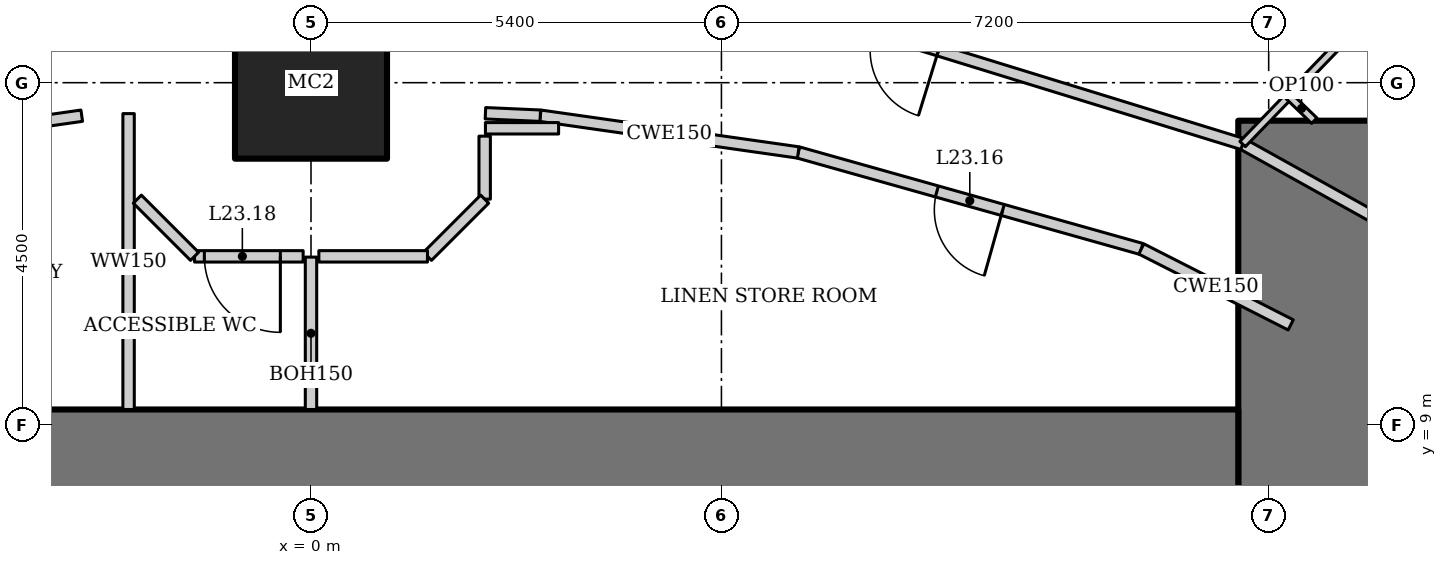
"""IFC4 building model, lengths in metres.
Left out: names, types, materials, properties, quantities, classifications, styles, units other than length and angle.
Written with IfcOpenShell. Run it as: python <this file> out.ifc"""

import sys

from ifc_helpers import new_model, si_unit, direction, frame, frame_2d, origin, origin_2d, place, context, subcontext, project, spatial, rectangle, hollow_rectangle, extrude, element, fill, save


model = new_model("IFC4")
c1 = context("Model", 3, precision=1e-05, world=origin(), true_north=direction((0.0, 1.0)))
c2 = subcontext(c1, "Body", "Model", "MODEL_VIEW")
j1 = project(units=[si_unit("LENGTHUNIT", "METRE"), si_unit("PLANEANGLEUNIT", "RADIAN")], contexts=[c1])
p1 = place(None, origin())
s1 = spatial("IfcSite", under=j1, at=p1, CompositionType="ELEMENT")
p2 = place(p1, origin())
s2 = spatial("IfcBuilding", under=s1, at=p2, CompositionType="ELEMENT")
p3 = place(p2, frame((0.0, 0.0, 98.2)))
s3 = spatial("IfcBuildingStorey", under=s2, at=p3, CompositionType="ELEMENT", Elevation=98.2)
p4 = place(p3, frame((0.0, 13.5, 0.0), z_axis=(0.0, 0.0, 1.0), x_axis=(1.0, 0.0, 0.0)))
e1 = element("IfcColumn", 1, at=p4, inside=s3, PredefinedType="COLUMN", context=c2, shape_type="SweptSolid", body=[
    extrude(hollow_rectangle(XDim=2.0, YDim=2.0, WallThickness=0.17, at=origin_2d()), origin(), (0.0, 0.0, 1.0), 3.6),
])
p5 = place(p3, frame((13.2, -13.0, 0.0), z_axis=(0.0, 0.0, 1.0), x_axis=(0.0, 1.0, 0.0)))
e2 = element("IfcWall", 2, at=p5, inside=s3, PredefinedType="SHEAR", context=c2, shape_type="SweptSolid", body=[
    extrude(rectangle(XDim=26.0, YDim=2.0, at=frame_2d((13.0, 0.0))), origin(), (0.0, 0.0, 1.0), 3.6),
])
p6 = place(p5, frame((12.1, 0.0, 0.0)))
e3 = element("IfcOpeningElement", 3, at=p6, cuts=e2, PredefinedType="OPENING", context=c2, shape_type="SweptSolid", body=[
    extrude(rectangle(XDim=1.8, YDim=2.1, at=frame_2d((0.9, 1.05))), frame((0.0, 1.01, 0.0), z_axis=(0.0, -1.0, 0.0), x_axis=(1.0, 0.0, 0.0)), (0.0, 0.0, 1.0), 2.02),
])
p7 = place(p3, frame((12.2, 8.0, 0.0), z_axis=(0.0, 0.0, 1.0), x_axis=(-1.0, 0.0, 0.0)))
e4 = element("IfcWall", 4, at=p7, inside=s3, PredefinedType="SHEAR", context=c2, shape_type="SweptSolid", body=[
    extrude(rectangle(XDim=24.4, YDim=2.4, at=frame_2d((12.2, 0.0))), origin(), (0.0, 0.0, 1.0), 3.6),
])
p8 = place(p3, frame((17.299, 9.885, 0.0), z_axis=(0.0, 0.0, 1.0), x_axis=(-0.873695910579, 0.486472461541, 0.0)))
e5 = element("IfcWall", 5, at=p8, inside=s3, PredefinedType="PARTITIONING", context=c2, shape_type="SweptSolid", body=[
    extrude(rectangle(XDim=5.771, YDim=0.15, at=frame_2d((2.885, 0.0))), origin(), (0.0, 0.0, 1.0), 3.45),
])
p9 = place(p3, frame((12.257, 12.693, 0.0), z_axis=(0.0, 0.0, 1.0), x_axis=(-0.955657956744, 0.294478980085, 0.0)))
e6 = element("IfcWall", 6, at=p9, inside=s3, PredefinedType="PARTITIONING", context=c2, shape_type="SweptSolid", body=[
    extrude(rectangle(XDim=5.236, YDim=0.15, at=frame_2d((2.618, 0.0))), origin(), (0.0, 0.0, 1.0), 3.45),
])
p10 = place(p9, frame((4.186, 0.0, 0.0)))
e7 = element("IfcOpeningElement", 7, at=p10, cuts=e6, PredefinedType="OPENING", context=c2, shape_type="SweptSolid", body=[
    extrude(rectangle(XDim=0.9, YDim=2.1, at=frame_2d((0.45, 1.05))), frame((0.0, 0.085, 0.0), z_axis=(0.0, -1.0, 0.0), x_axis=(1.0, 0.0, 0.0)), (0.0, 0.0, 1.0), 0.17),
])
p11 = place(p3, frame((10.924, 11.312, 0.0), z_axis=(0.0, 0.0, 1.0), x_axis=(-0.962643729928, 0.270771211967, 0.0)))
e8 = element("IfcWall", 8, at=p11, inside=s3, PredefinedType="PARTITIONING", context=c2, shape_type="SweptSolid", body=[
    extrude(rectangle(XDim=4.688, YDim=0.15, at=frame_2d((2.344, 0.0))), origin(), (0.0, 0.0, 1.0), 3.45),
])
p12 = place(p11, frame((1.894, 0.0, 0.0)))
e9 = element("IfcOpeningElement", 9, at=p12, cuts=e8, PredefinedType="OPENING", context=c2, shape_type="SweptSolid", body=[
    extrude(rectangle(XDim=0.9, YDim=2.1, at=frame_2d((0.45, 1.05))), frame((0.0, 0.085, 0.0), z_axis=(0.0, -1.0, 0.0), x_axis=(1.0, 0.0, 0.0)), (0.0, 0.0, 1.0), 0.17),
])
p13 = place(p3, frame((6.411, 12.582, 0.0), z_axis=(0.0, 0.0, 1.0), x_axis=(-0.990002114939, 0.14105251652, 0.0)))
e10 = element("IfcWall", 10, at=p13, inside=s3, PredefinedType="PARTITIONING", context=c2, shape_type="SweptSolid", body=[
    extrude(rectangle(XDim=3.429, YDim=0.15, at=frame_2d((1.714, 0.0))), origin(), (0.0, 0.0, 1.0), 3.45),
])
p14 = place(p3, frame((-3.016, 13.066, 0.0), z_axis=(0.0, 0.0, 1.0), x_axis=(-0.990002114939, -0.14105251652, 0.0)))
e11 = element("IfcWall", 11, at=p14, inside=s3, PredefinedType="PARTITIONING", context=c2, shape_type="SweptSolid", body=[
    extrude(rectangle(XDim=3.429, YDim=0.15, at=frame_2d((1.714, 0.0))), origin(), (0.0, 0.0, 1.0), 3.45),
])
p15 = place(p14, frame((1.195, 0.0, 0.0)))
e12 = element("IfcOpeningElement", 12, at=p15, cuts=e11, PredefinedType="OPENING", context=c2, shape_type="SweptSolid", body=[
    extrude(rectangle(XDim=0.9, YDim=2.1, at=frame_2d((0.45, 1.05))), frame((0.0, 0.085, 0.0), z_axis=(0.0, -1.0, 0.0), x_axis=(1.0, 0.0, 0.0)), (0.0, 0.0, 1.0), 0.17),
])
p16 = place(p3, frame((-2.4, 9.2, 0.0), z_axis=(0.0, 0.0, 1.0), x_axis=(0.0, 1.0, 0.0)))
e13 = element("IfcWall", 13, at=p16, inside=s3, PredefinedType="SOLIDWALL", context=c2, shape_type="SweptSolid", body=[
    extrude(rectangle(XDim=3.893, YDim=0.15, at=frame_2d((1.947, 0.0))), origin(), (0.0, 0.0, 1.0), 2.767),
])
p17 = place(p3, frame((16.944, 17.545, 0.0), z_axis=(0.0, 0.0, 1.0), x_axis=(-0.694677175107, -0.719321640426, 0.0)))
e14 = element("IfcWall", 14, at=p17, inside=s3, PredefinedType="PARTITIONING", context=c2, shape_type="SweptSolid", body=[
    extrude(rectangle(XDim=6.746, YDim=0.1, at=frame_2d((3.373, 0.0))), origin(), (0.0, 0.0, 1.0), 2.528),
])
p18 = place(p17, frame((2.923, 0.0, 0.0)))
e15 = element("IfcOpeningElement", 15, at=p18, cuts=e14, PredefinedType="OPENING", context=c2, shape_type="SweptSolid", body=[
    extrude(rectangle(XDim=0.9, YDim=2.1, at=frame_2d((0.45, 1.05))), frame((0.0, 0.06, 0.0), z_axis=(0.0, -1.0, 0.0), x_axis=(1.0, 0.0, 0.0)), (0.0, 0.0, 1.0), 0.12),
])
p19 = place(p3, frame((13.2, 13.0, 0.0), z_axis=(0.0, 0.0, 1.0), x_axis=(-0.719347134512, 0.69465077562, 0.0)))
e16 = element("IfcWall", 16, at=p19, inside=s3, PredefinedType="PARTITIONING", context=c2, shape_type="SweptSolid", body=[
    extrude(rectangle(XDim=0.465, YDim=0.1, at=frame_2d((0.232, 0.0))), origin(), (0.0, 0.0, 1.0), 3.45),
])
p20 = place(p3, frame((3.016, 13.066, 0.0), z_axis=(0.0, 0.0, 1.0), x_axis=(-0.999003783932, 0.044625549739, 0.0)))
e17 = element("IfcWall", 17, at=p20, inside=s3, PredefinedType="PARTITIONING", context=c2, shape_type="SweptSolid", body=[
    extrude(rectangle(XDim=0.722, YDim=0.15, at=frame_2d((0.361, 0.0))), origin(), (0.0, 0.0, 1.0), 3.45),
])
p21 = place(p3, frame((0.0, 9.2, 0.0), z_axis=(0.0, 0.0, 1.0), x_axis=(0.0, 1.0, 0.0)))
e18 = element("IfcWall", 18, at=p21, inside=s3, PredefinedType="PARTITIONING", context=c2, shape_type="SweptSolid", body=[
    extrude(rectangle(XDim=2.005, YDim=0.15, at=frame_2d((1.002, 0.0))), origin(), (0.0, 0.0, 1.0), 3.044),
])
p22 = place(p3, frame((3.258, 12.9, 0.0), z_axis=(0.0, 0.0, 1.0), x_axis=(-1.0, 0.0, 0.0)))
e19 = element("IfcWall", 19, at=p22, inside=s3, PredefinedType="PARTITIONING", context=c2, shape_type="SweptSolid", body=[
    extrude(rectangle(XDim=0.963, YDim=0.15, at=frame_2d((0.481, 0.0))), origin(), (0.0, 0.0, 1.0), 3.45),
])
p23 = place(p3, frame((2.285, 12.797, 0.0), z_axis=(0.0, 0.0, 1.0), x_axis=(0.0, -1.0, 0.0)))
e20 = element("IfcWall", 20, at=p23, inside=s3, PredefinedType="PARTITIONING", context=c2, shape_type="SweptSolid", body=[
    extrude(rectangle(XDim=0.829, YDim=0.15, at=frame_2d((0.415, 0.0))), origin(), (0.0, 0.0, 1.0), 3.45),
])
p24 = place(p3, frame((2.285, 11.968, 0.0), z_axis=(0.0, 0.0, 1.0), x_axis=(-0.707106781187, -0.707106781187, 0.0)))
e21 = element("IfcWall", 21, at=p24, inside=s3, PredefinedType="PARTITIONING", context=c2, shape_type="SweptSolid", body=[
    extrude(rectangle(XDim=1.064, YDim=0.15, at=frame_2d((0.532, 0.0))), origin(), (0.0, 0.0, 1.0), 3.45),
])
p25 = place(p3, frame((1.532, 11.215, 0.0), z_axis=(0.0, 0.0, 1.0), x_axis=(-1.0, 0.0, 0.0)))
e22 = element("IfcWall", 22, at=p25, inside=s3, PredefinedType="PARTITIONING", context=c2, shape_type="SweptSolid", body=[
    extrude(rectangle(XDim=1.429, YDim=0.15, at=frame_2d((0.714, 0.0))), origin(), (0.0, 0.0, 1.0), 3.45),
])
p26 = place(p3, frame((-0.103, 11.215, 0.0), z_axis=(0.0, 0.0, 1.0), x_axis=(-1.0, 0.0, 0.0)))
e23 = element("IfcWall", 23, at=p26, inside=s3, PredefinedType="PARTITIONING", context=c2, shape_type="SweptSolid", body=[
    extrude(rectangle(XDim=1.429, YDim=0.15, at=frame_2d((0.714, 0.0))), origin(), (0.0, 0.0, 1.0), 3.45),
])
p27 = place(p26, frame((0.3, 0.0, 0.0)))
e24 = element("IfcOpeningElement", 24, at=p27, cuts=e23, PredefinedType="OPENING", context=c2, shape_type="SweptSolid", body=[
    extrude(rectangle(XDim=1.0, YDim=2.1, at=frame_2d((0.5, 1.05))), frame((0.0, 0.085, 0.0), z_axis=(0.0, -1.0, 0.0), x_axis=(1.0, 0.0, 0.0)), (0.0, 0.0, 1.0), 0.17),
])
p28 = place(p3, frame((-1.532, 11.215, 0.0), z_axis=(0.0, 0.0, 1.0), x_axis=(-0.707106781187, 0.707106781187, 0.0)))
e25 = element("IfcWall", 25, at=p28, inside=s3, PredefinedType="PARTITIONING", context=c2, shape_type="SweptSolid", body=[
    extrude(rectangle(XDim=1.064, YDim=0.15, at=frame_2d((0.532, 0.0))), origin(), (0.0, 0.0, 1.0), 3.45),
])
p29 = place(p3, frame((12.89, 10.313, 0.0), z_axis=(0.0, 0.0, 1.0), x_axis=(-0.891372999417, 0.453270532805, 0.0)))
e26 = element("IfcWall", 26, at=p29, inside=s3, PredefinedType="PARTITIONING", context=c2, shape_type="SweptSolid", body=[
    extrude(rectangle(XDim=2.205, YDim=0.15, at=frame_2d((1.103, 0.0))), origin(), (0.0, 0.0, 1.0), 3.45),
])
p30 = place(p12, origin())
e27 = element("IfcDoor", 27, at=p30, inside=s3, OperationType="SINGLE_SWING_LEFT", PredefinedType="DOOR", context=c2, shape_type="SweptSolid", body=[
    extrude(rectangle(XDim=0.9, YDim=2.1, at=frame_2d((0.45, 1.05))), frame((0.0, 0.025, 0.0), z_axis=(0.0, -1.0, 0.0), x_axis=(1.0, 0.0, 0.0)), (0.0, 0.0, 1.0), 0.05),
])
fill(e9, e27)
p31 = place(p27, origin())
e28 = element("IfcDoor", 28, at=p31, inside=s3, OperationType="SINGLE_SWING_LEFT", PredefinedType="DOOR", context=c2, shape_type="SweptSolid", body=[
    extrude(rectangle(XDim=1.0, YDim=2.1, at=frame_2d((0.5, 1.05))), frame((0.0, 0.025, 0.0), z_axis=(0.0, -1.0, 0.0), x_axis=(1.0, 0.0, 0.0)), (0.0, 0.0, 1.0), 0.05),
])
fill(e24, e28)
save(model, sys.argv[1])
